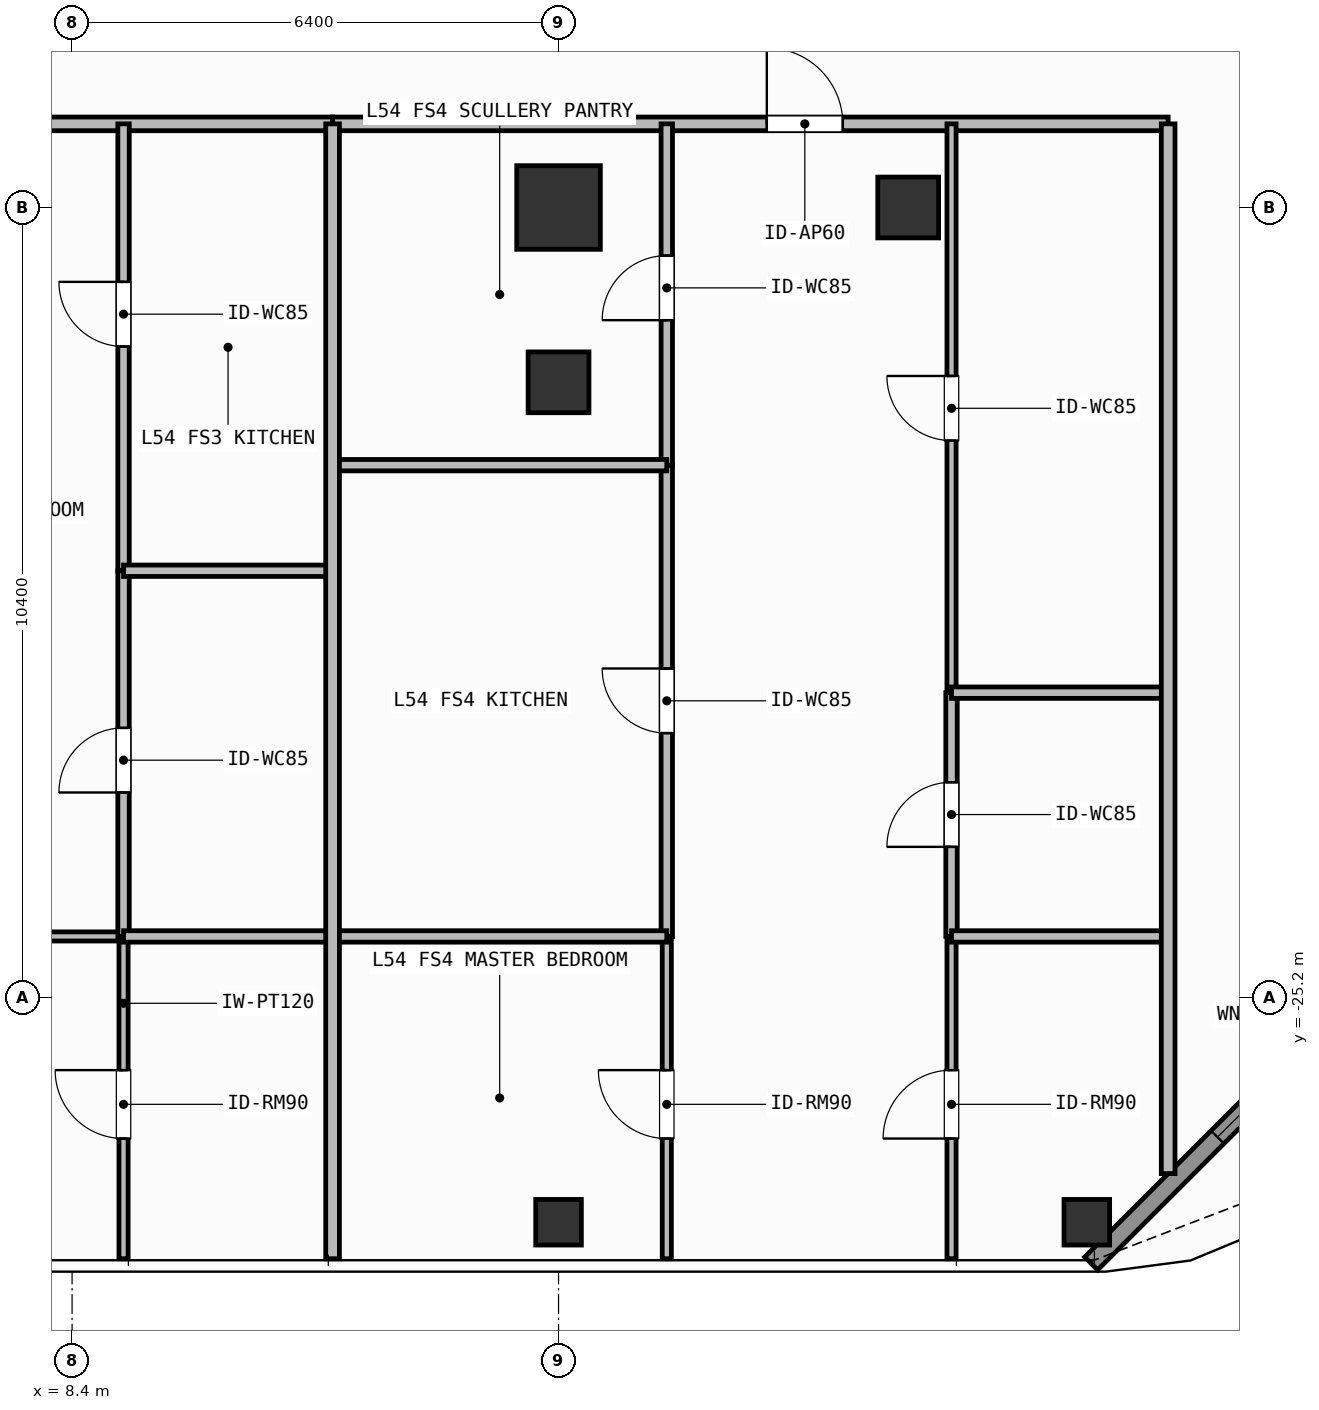
"""IFC4 building model, lengths in metres.
Left out: names, types, materials, properties, quantities, classifications, styles, units other than length and angle.
Written with IfcOpenShell. Run it as: python <this file> out.ifc"""

import sys

from ifc_helpers import new_model, si_unit, direction, frame, frame_2d, origin, origin_2d, place, context, subcontext, project, spatial, rectangle, hollow_rectangle, extrude, element, fill, save


model = new_model("IFC4")
c1 = context("Model", 3, precision=1e-05, world=origin(), true_north=direction((0.0, 1.0)))
c2 = subcontext(c1, "Body", "Model", "MODEL_VIEW")
j1 = project(units=[si_unit("LENGTHUNIT", "METRE"), si_unit("PLANEANGLEUNIT", "RADIAN")], contexts=[c1])
p1 = place(None, origin())
s1 = spatial("IfcSite", under=j1, at=p1, CompositionType="ELEMENT")
p2 = place(p1, origin())
s2 = spatial("IfcBuilding", under=s1, at=p2, CompositionType="ELEMENT")
p3 = place(p2, frame((0.0, 0.0, 219.6)))
s3 = spatial("IfcBuildingStorey", under=s2, at=p3, CompositionType="ELEMENT", Elevation=219.6)
p4 = place(p3, frame((14.8, -14.8, 0.0), z_axis=(0.0, 0.0, 1.0), x_axis=(1.0, 0.0, 0.0)))
e1 = element("IfcColumn", 1, at=p4, inside=s3, PredefinedType="COLUMN", context=c2, shape_type="SweptSolid", body=[
    extrude(rectangle(XDim=1.1, YDim=1.1, at=origin_2d()), origin(), (0.0, 0.0, 1.0), 3.9),
])
for number, where, z_axis, x_axis in (
    (2, (19.4, -14.8, 0.0), (0.0, 0.0, 1.0), (1.0, 0.0, 0.0)),
    (3, (14.8, -17.1, 0.0), (0.0, 0.0, 1.0), (1.0, 0.0, 0.0)),
):
    element("IfcColumn", number, at=place(p3, frame(where, z_axis=z_axis, x_axis=x_axis)), inside=s3, PredefinedType="COLUMN", context=c2, shape_type="SweptSolid", body=[
        extrude(hollow_rectangle(XDim=0.8, YDim=0.8, WallThickness=0.036, at=origin_2d()), origin(), (0.0, 0.0, 1.0), 3.9),
    ])
for number, where, z_axis, x_axis in (
    (4, (21.75, -28.15, 0.0), (0.0, 0.0, 1.0), (1.0, 0.0, 0.0)),
    (5, (14.8, -28.15, 0.0), (0.0, 0.0, 1.0), (1.0, 0.0, 0.0)),
):
    element("IfcColumn", number, at=place(p3, frame(where, z_axis=z_axis, x_axis=x_axis)), inside=s3, PredefinedType="COLUMN", context=c2, shape_type="SweptSolid", body=[
        extrude(hollow_rectangle(XDim=0.6, YDim=0.6, WallThickness=0.028, at=origin_2d()), origin(), (0.0, 0.0, 1.0), 3.9),
    ])
p5 = place(p3, frame((26.192, -24.308, 0.0), z_axis=(0.0, 0.0, 1.0), x_axis=(-0.707106781187, -0.707106781187, 0.0)))
e6 = element("IfcWall", 6, at=p5, inside=s3, PredefinedType="SOLIDWALL", context=c2, shape_type="SweptSolid", body=[
    extrude(rectangle(XDim=6.201, YDim=0.24, at=frame_2d((3.101, 0.0))), origin(), (0.0, 0.0, 1.0), 3.68),
])
p6 = place(p5, frame((2.351, 0.0, 0.8)))
e7 = element("IfcOpeningElement", 7, at=p6, cuts=e6, PredefinedType="OPENING", context=c2, shape_type="SweptSolid", body=[
    extrude(rectangle(XDim=1.5, YDim=1.85, at=frame_2d((0.75, 0.925))), frame((0.0, 0.13, 0.0), z_axis=(0.0, -1.0, 0.0), x_axis=(1.0, 0.0, 0.0)), (0.0, 0.0, 1.0), 0.26),
])
p7 = place(p3, frame((3.9, -13.7, 0.0), z_axis=(0.0, 0.0, 1.0), x_axis=(1.0, 0.0, 0.0)))
e8 = element("IfcWall", 8, at=p7, inside=s3, PredefinedType="PARTITIONING", context=c2, shape_type="SweptSolid", body=[
    extrude(rectangle(XDim=7.927, YDim=0.18, at=frame_2d((3.963, 0.0))), origin(), (0.0, 0.0, 1.0), 3.68),
])
p8 = place(p7, frame((1.767, 0.0, 0.0)))
e9 = element("IfcOpeningElement", 9, at=p8, cuts=e8, PredefinedType="OPENING", context=c2, shape_type="SweptSolid", body=[
    extrude(rectangle(XDim=1.0, YDim=2.2, at=frame_2d((0.5, 1.1))), frame((0.0, 0.1, 0.0), z_axis=(0.0, -1.0, 0.0), x_axis=(1.0, 0.0, 0.0)), (0.0, 0.0, 1.0), 0.2),
])
p9 = place(p3, frame((3.9, -24.39, 0.0), z_axis=(0.0, 0.0, 1.0), x_axis=(1.0, 0.0, 0.0)))
e10 = element("IfcWall", 10, at=p9, inside=s3, PredefinedType="PARTITIONING", context=c2, shape_type="SweptSolid", body=[
    extrude(rectangle(XDim=5.177, YDim=0.12, at=frame_2d((2.588, 0.0))), origin(), (0.0, 0.0, 1.0), 3.68),
])
p10 = place(p9, frame((2.138, 0.0, 0.0)))
e11 = element("IfcOpeningElement", 11, at=p10, cuts=e10, PredefinedType="OPENING", context=c2, shape_type="SweptSolid", body=[
    extrude(rectangle(XDim=0.9, YDim=2.1, at=frame_2d((0.45, 1.05))), frame((0.0, 0.07, 0.0), z_axis=(0.0, -1.0, 0.0), x_axis=(1.0, 0.0, 0.0)), (0.0, 0.0, 1.0), 0.14),
])
p11 = place(p3, frame((9.077, -19.579, 0.0), z_axis=(0.0, 0.0, 1.0), x_axis=(0.0, 1.0, 0.0)))
e12 = element("IfcWall", 12, at=p11, inside=s3, PredefinedType="PARTITIONING", context=c2, shape_type="SweptSolid", body=[
    extrude(rectangle(XDim=5.879, YDim=0.15, at=frame_2d((2.939, 0.0))), origin(), (0.0, 0.0, 1.0), 3.68),
])
p12 = place(p11, frame((2.95, 0.0, 0.0)))
e13 = element("IfcOpeningElement", 13, at=p12, cuts=e12, PredefinedType="OPENING", context=c2, shape_type="SweptSolid", body=[
    extrude(rectangle(XDim=0.85, YDim=2.1, at=frame_2d((0.425, 1.05))), frame((0.0, 0.085, 0.0), z_axis=(0.0, -1.0, 0.0), x_axis=(1.0, 0.0, 0.0)), (0.0, 0.0, 1.0), 0.17),
])
p13 = place(p3, frame((9.077, -24.39, 0.0), z_axis=(0.0, 0.0, 1.0), x_axis=(0.0, 1.0, 0.0)))
e14 = element("IfcWall", 14, at=p13, inside=s3, PredefinedType="PARTITIONING", context=c2, shape_type="SweptSolid", body=[
    extrude(rectangle(XDim=4.811, YDim=0.15, at=frame_2d((2.405, 0.0))), origin(), (0.0, 0.0, 1.0), 3.68),
])
p14 = place(p13, frame((1.894, 0.0, 0.0)))
e15 = element("IfcOpeningElement", 15, at=p14, cuts=e14, PredefinedType="OPENING", context=c2, shape_type="SweptSolid", body=[
    extrude(rectangle(XDim=0.85, YDim=2.1, at=frame_2d((0.425, 1.05))), frame((0.0, 0.085, 0.0), z_axis=(0.0, -1.0, 0.0), x_axis=(1.0, 0.0, 0.0)), (0.0, 0.0, 1.0), 0.17),
])
p15 = place(p3, frame((9.077, -28.63, 0.0), z_axis=(0.0, 0.0, 1.0), x_axis=(0.0, 1.0, 0.0)))
e16 = element("IfcWall", 16, at=p15, inside=s3, PredefinedType="PARTITIONING", context=c2, shape_type="SweptSolid", body=[
    extrude(rectangle(XDim=4.24, YDim=0.12, at=frame_2d((2.12, 0.0))), origin(), (0.0, 0.0, 1.0), 3.68),
])
p16 = place(p15, frame((1.581, 0.0, 0.0)))
e17 = element("IfcOpeningElement", 17, at=p16, cuts=e16, PredefinedType="OPENING", context=c2, shape_type="SweptSolid", body=[
    extrude(rectangle(XDim=0.9, YDim=2.1, at=frame_2d((0.45, 1.05))), frame((0.0, 0.07, 0.0), z_axis=(0.0, -1.0, 0.0), x_axis=(1.0, 0.0, 0.0)), (0.0, 0.0, 1.0), 0.14),
])
p17 = place(p3, frame((11.827, -13.7, 0.0), z_axis=(0.0, 0.0, 1.0), x_axis=(1.0, 0.0, 0.0)))
e18 = element("IfcWall", 18, at=p17, inside=s3, PredefinedType="PARTITIONING", context=c2, shape_type="SweptSolid", body=[
    extrude(rectangle(XDim=10.993, YDim=0.18, at=frame_2d((5.497, 0.0))), origin(), (0.0, 0.0, 1.0), 3.68),
])
p18 = place(p17, frame((5.713, 0.0, 0.0)))
e19 = element("IfcOpeningElement", 19, at=p18, cuts=e18, PredefinedType="OPENING", context=c2, shape_type="SweptSolid", body=[
    extrude(rectangle(XDim=1.0, YDim=2.2, at=frame_2d((0.5, 1.1))), frame((0.0, 0.1, 0.0), z_axis=(0.0, -1.0, 0.0), x_axis=(1.0, 0.0, 0.0)), (0.0, 0.0, 1.0), 0.2),
])
p19 = place(p3, frame((16.224, -24.39, 0.0), z_axis=(0.0, 0.0, 1.0), x_axis=(0.0, 1.0, 0.0)))
e20 = element("IfcWall", 20, at=p19, inside=s3, PredefinedType="PARTITIONING", context=c2, shape_type="SweptSolid", body=[
    extrude(rectangle(XDim=6.2, YDim=0.15, at=frame_2d((3.1, 0.0))), origin(), (0.0, 0.0, 1.0), 3.68),
])
p20 = place(p19, frame((2.675, 0.0, 0.0)))
e21 = element("IfcOpeningElement", 21, at=p20, cuts=e20, PredefinedType="OPENING", context=c2, shape_type="SweptSolid", body=[
    extrude(rectangle(XDim=0.85, YDim=2.1, at=frame_2d((0.425, 1.05))), frame((0.0, 0.085, 0.0), z_axis=(0.0, -1.0, 0.0), x_axis=(1.0, 0.0, 0.0)), (0.0, 0.0, 1.0), 0.17),
])
p21 = place(p3, frame((16.224, -18.19, 0.0), z_axis=(0.0, 0.0, 1.0), x_axis=(0.0, 1.0, 0.0)))
e22 = element("IfcWall", 22, at=p21, inside=s3, PredefinedType="PARTITIONING", context=c2, shape_type="SweptSolid", body=[
    extrude(rectangle(XDim=4.49, YDim=0.15, at=frame_2d((2.245, 0.0))), origin(), (0.0, 0.0, 1.0), 3.68),
])
p22 = place(p21, frame((1.907, 0.0, 0.0)))
e23 = element("IfcOpeningElement", 23, at=p22, cuts=e22, PredefinedType="OPENING", context=c2, shape_type="SweptSolid", body=[
    extrude(rectangle(XDim=0.85, YDim=2.1, at=frame_2d((0.425, 1.05))), frame((0.0, 0.085, 0.0), z_axis=(0.0, -1.0, 0.0), x_axis=(1.0, 0.0, 0.0)), (0.0, 0.0, 1.0), 0.17),
])
p23 = place(p3, frame((16.224, -28.63, 0.0), z_axis=(0.0, 0.0, 1.0), x_axis=(0.0, 1.0, 0.0)))
e24 = element("IfcWall", 24, at=p23, inside=s3, PredefinedType="PARTITIONING", context=c2, shape_type="SweptSolid", body=[
    extrude(rectangle(XDim=4.24, YDim=0.12, at=frame_2d((2.12, 0.0))), origin(), (0.0, 0.0, 1.0), 3.68),
])
p24 = place(p23, frame((1.581, 0.0, 0.0)))
e25 = element("IfcOpeningElement", 25, at=p24, cuts=e24, PredefinedType="OPENING", context=c2, shape_type="SweptSolid", body=[
    extrude(rectangle(XDim=0.9, YDim=2.1, at=frame_2d((0.45, 1.05))), frame((0.0, 0.07, 0.0), z_axis=(0.0, -1.0, 0.0), x_axis=(1.0, 0.0, 0.0)), (0.0, 0.0, 1.0), 0.14),
])
p25 = place(p3, frame((19.97, -24.39, 0.0), z_axis=(0.0, 0.0, 1.0), x_axis=(0.0, 1.0, 0.0)))
e26 = element("IfcWall", 26, at=p25, inside=s3, PredefinedType="PARTITIONING", context=c2, shape_type="SweptSolid", body=[
    extrude(rectangle(XDim=3.207, YDim=0.15, at=frame_2d((1.604, 0.0))), origin(), (0.0, 0.0, 1.0), 3.68),
])
p26 = place(p25, frame((1.178, 0.0, 0.0)))
e27 = element("IfcOpeningElement", 27, at=p26, cuts=e26, PredefinedType="OPENING", context=c2, shape_type="SweptSolid", body=[
    extrude(rectangle(XDim=0.85, YDim=2.1, at=frame_2d((0.425, 1.05))), frame((0.0, 0.085, 0.0), z_axis=(0.0, -1.0, 0.0), x_axis=(1.0, 0.0, 0.0)), (0.0, 0.0, 1.0), 0.17),
])
p27 = place(p3, frame((19.97, -21.183, 0.0), z_axis=(0.0, 0.0, 1.0), x_axis=(0.0, 1.0, 0.0)))
e28 = element("IfcWall", 28, at=p27, inside=s3, PredefinedType="PARTITIONING", context=c2, shape_type="SweptSolid", body=[
    extrude(rectangle(XDim=7.483, YDim=0.12, at=frame_2d((3.742, 0.0))), origin(), (0.0, 0.0, 1.0), 3.68),
])
p28 = place(p27, frame((3.316, 0.0, 0.0)))
e29 = element("IfcOpeningElement", 29, at=p28, cuts=e28, PredefinedType="OPENING", context=c2, shape_type="SweptSolid", body=[
    extrude(rectangle(XDim=0.85, YDim=2.1, at=frame_2d((0.425, 1.05))), frame((0.0, 0.07, 0.0), z_axis=(0.0, -1.0, 0.0), x_axis=(1.0, 0.0, 0.0)), (0.0, 0.0, 1.0), 0.14),
])
p29 = place(p3, frame((19.97, -28.63, 0.0), z_axis=(0.0, 0.0, 1.0), x_axis=(0.0, 1.0, 0.0)))
e30 = element("IfcWall", 30, at=p29, inside=s3, PredefinedType="PARTITIONING", context=c2, shape_type="SweptSolid", body=[
    extrude(rectangle(XDim=4.24, YDim=0.12, at=frame_2d((2.12, 0.0))), origin(), (0.0, 0.0, 1.0), 3.68),
])
p30 = place(p29, frame((1.581, 0.0, 0.0)))
e31 = element("IfcOpeningElement", 31, at=p30, cuts=e30, PredefinedType="OPENING", context=c2, shape_type="SweptSolid", body=[
    extrude(rectangle(XDim=0.9, YDim=2.1, at=frame_2d((0.45, 1.05))), frame((0.0, 0.07, 0.0), z_axis=(0.0, -1.0, 0.0), x_axis=(1.0, 0.0, 0.0)), (0.0, 0.0, 1.0), 0.14),
])
for number, where, z_axis, x_axis in (
    (32, (9.077, -19.579, 0.0), (0.0, 0.0, 1.0), (1.0, 0.0, 0.0)),
    (33, (9.077, -24.39, 0.0), (0.0, 0.0, 1.0), (1.0, 0.0, 0.0)),
):
    element("IfcWall", number, at=place(p3, frame(where, z_axis=z_axis, x_axis=x_axis)), inside=s3, PredefinedType="PARTITIONING", context=c2, shape_type="SweptSolid", body=[
        extrude(rectangle(XDim=2.75, YDim=0.15, at=frame_2d((1.375, 0.0))), origin(), (0.0, 0.0, 1.0), 3.68),
    ])
for number, where, z_axis, x_axis in (
    (34, (11.827, -18.19, 0.0), (0.0, 0.0, 1.0), (1.0, 0.0, 0.0)),
    (35, (11.827, -24.39, 0.0), (0.0, 0.0, 1.0), (1.0, 0.0, 0.0)),
):
    element("IfcWall", number, at=place(p3, frame(where, z_axis=z_axis, x_axis=x_axis)), inside=s3, PredefinedType="PARTITIONING", context=c2, shape_type="SweptSolid", body=[
        extrude(rectangle(XDim=4.397, YDim=0.15, at=frame_2d((2.199, 0.0))), origin(), (0.0, 0.0, 1.0), 3.68),
    ])
for number, where, z_axis, x_axis in (
    (36, (19.97, -21.183, 0.0), (0.0, 0.0, 1.0), (1.0, 0.0, 0.0)),
    (37, (19.97, -24.39, 0.0), (0.0, 0.0, 1.0), (1.0, 0.0, 0.0)),
):
    element("IfcWall", number, at=place(p3, frame(where, z_axis=z_axis, x_axis=x_axis)), inside=s3, PredefinedType="PARTITIONING", context=c2, shape_type="SweptSolid", body=[
        extrude(rectangle(XDim=2.85, YDim=0.15, at=frame_2d((1.425, 0.0))), origin(), (0.0, 0.0, 1.0), 3.68),
    ])
p31 = place(p3, frame((11.827, -28.63, 0.0), z_axis=(0.0, 0.0, 1.0), x_axis=(0.0, 1.0, 0.0)))
e38 = element("IfcWall", 38, at=p31, inside=s3, PredefinedType="PARTITIONING", context=c2, shape_type="SweptSolid", body=[
    extrude(rectangle(XDim=14.93, YDim=0.18, at=frame_2d((7.465, 0.0))), origin(), (0.0, 0.0, 1.0), 3.68),
])
p32 = place(p3, frame((22.82, -27.51, 0.0), z_axis=(0.0, 0.0, 1.0), x_axis=(0.0, 1.0, 0.0)))
e39 = element("IfcWall", 39, at=p32, inside=s3, PredefinedType="PARTITIONING", context=c2, shape_type="SweptSolid", body=[
    extrude(rectangle(XDim=13.81, YDim=0.18, at=frame_2d((6.905, 0.0))), origin(), (0.0, 0.0, 1.0), 3.68),
])
p33 = place(p6, origin())
e40 = element("IfcWindow", 40, at=p33, inside=s3, PartitioningType="SINGLE_PANEL", PredefinedType="WINDOW", context=c2, shape_type="SweptSolid", body=[
    extrude(rectangle(XDim=1.5, YDim=1.85, at=frame_2d((0.75, 0.925))), frame((0.0, 0.03, 0.0), z_axis=(0.0, -1.0, 0.0), x_axis=(1.0, 0.0, 0.0)), (0.0, 0.0, 1.0), 0.06),
])
fill(e7, e40)
p34 = place(p12, origin())
e41 = element("IfcDoor", 41, at=p34, inside=s3, OperationType="SINGLE_SWING_RIGHT", PredefinedType="DOOR", context=c2, shape_type="SweptSolid", body=[
    extrude(rectangle(XDim=0.85, YDim=2.1, at=frame_2d((0.425, 1.05))), frame((0.0, 0.025, 0.0), z_axis=(0.0, -1.0, 0.0), x_axis=(1.0, 0.0, 0.0)), (0.0, 0.0, 1.0), 0.05),
])
fill(e13, e41)
p35 = place(p14, origin())
e42 = element("IfcDoor", 42, at=p35, inside=s3, OperationType="SINGLE_SWING_LEFT", PredefinedType="DOOR", context=c2, shape_type="SweptSolid", body=[
    extrude(rectangle(XDim=0.85, YDim=2.1, at=frame_2d((0.425, 1.05))), frame((0.0, 0.025, 0.0), z_axis=(0.0, -1.0, 0.0), x_axis=(1.0, 0.0, 0.0)), (0.0, 0.0, 1.0), 0.05),
])
fill(e15, e42)
p36 = place(p16, origin())
e43 = element("IfcDoor", 43, at=p36, inside=s3, OperationType="SINGLE_SWING_RIGHT", PredefinedType="DOOR", context=c2, shape_type="SweptSolid", body=[
    extrude(rectangle(XDim=0.9, YDim=2.1, at=frame_2d((0.45, 1.05))), frame((0.0, 0.025, 0.0), z_axis=(0.0, -1.0, 0.0), x_axis=(1.0, 0.0, 0.0)), (0.0, 0.0, 1.0), 0.05),
])
fill(e17, e43)
p37 = place(p18, origin())
e44 = element("IfcDoor", 44, at=p37, inside=s3, OperationType="SINGLE_SWING_LEFT", PredefinedType="DOOR", context=c2, shape_type="SweptSolid", body=[
    extrude(rectangle(XDim=1.0, YDim=2.2, at=frame_2d((0.5, 1.1))), frame((0.0, 0.025, 0.0), z_axis=(0.0, -1.0, 0.0), x_axis=(1.0, 0.0, 0.0)), (0.0, 0.0, 1.0), 0.05),
])
fill(e19, e44)
p38 = place(p20, origin())
e45 = element("IfcDoor", 45, at=p38, inside=s3, OperationType="SINGLE_SWING_RIGHT", PredefinedType="DOOR", context=c2, shape_type="SweptSolid", body=[
    extrude(rectangle(XDim=0.85, YDim=2.1, at=frame_2d((0.425, 1.05))), frame((0.0, 0.025, 0.0), z_axis=(0.0, -1.0, 0.0), x_axis=(1.0, 0.0, 0.0)), (0.0, 0.0, 1.0), 0.05),
])
fill(e21, e45)
p39 = place(p22, origin())
e46 = element("IfcDoor", 46, at=p39, inside=s3, OperationType="SINGLE_SWING_LEFT", PredefinedType="DOOR", context=c2, shape_type="SweptSolid", body=[
    extrude(rectangle(XDim=0.85, YDim=2.1, at=frame_2d((0.425, 1.05))), frame((0.0, 0.025, 0.0), z_axis=(0.0, -1.0, 0.0), x_axis=(1.0, 0.0, 0.0)), (0.0, 0.0, 1.0), 0.05),
])
fill(e23, e46)
p40 = place(p24, origin())
e47 = element("IfcDoor", 47, at=p40, inside=s3, OperationType="SINGLE_SWING_RIGHT", PredefinedType="DOOR", context=c2, shape_type="SweptSolid", body=[
    extrude(rectangle(XDim=0.9, YDim=2.1, at=frame_2d((0.45, 1.05))), frame((0.0, 0.025, 0.0), z_axis=(0.0, -1.0, 0.0), x_axis=(1.0, 0.0, 0.0)), (0.0, 0.0, 1.0), 0.05),
])
fill(e25, e47)
p41 = place(p26, origin())
e48 = element("IfcDoor", 48, at=p41, inside=s3, OperationType="SINGLE_SWING_LEFT", PredefinedType="DOOR", context=c2, shape_type="SweptSolid", body=[
    extrude(rectangle(XDim=0.85, YDim=2.1, at=frame_2d((0.425, 1.05))), frame((0.0, 0.025, 0.0), z_axis=(0.0, -1.0, 0.0), x_axis=(1.0, 0.0, 0.0)), (0.0, 0.0, 1.0), 0.05),
])
fill(e27, e48)
p42 = place(p28, origin())
e49 = element("IfcDoor", 49, at=p42, inside=s3, OperationType="SINGLE_SWING_RIGHT", PredefinedType="DOOR", context=c2, shape_type="SweptSolid", body=[
    extrude(rectangle(XDim=0.85, YDim=2.1, at=frame_2d((0.425, 1.05))), frame((0.0, 0.025, 0.0), z_axis=(0.0, -1.0, 0.0), x_axis=(1.0, 0.0, 0.0)), (0.0, 0.0, 1.0), 0.05),
])
fill(e29, e49)
p43 = place(p30, origin())
e50 = element("IfcDoor", 50, at=p43, inside=s3, OperationType="SINGLE_SWING_LEFT", PredefinedType="DOOR", context=c2, shape_type="SweptSolid", body=[
    extrude(rectangle(XDim=0.9, YDim=2.1, at=frame_2d((0.45, 1.05))), frame((0.0, 0.025, 0.0), z_axis=(0.0, -1.0, 0.0), x_axis=(1.0, 0.0, 0.0)), (0.0, 0.0, 1.0), 0.05),
])
fill(e31, e50)
save(model, sys.argv[1])
